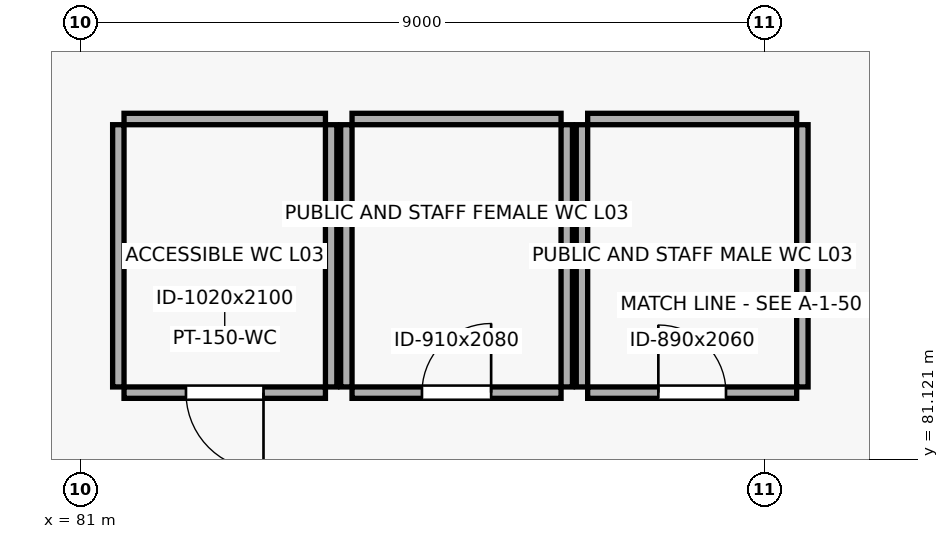
"""IFC4 building model, lengths in metres.
Left out: names, types, materials, properties, quantities, classifications, styles, units other than length and angle.
Written with IfcOpenShell. Run it as: python <this file> out.ifc"""

import sys

from ifc_helpers import new_model, si_unit, direction, frame, frame_2d, origin, place, context, subcontext, project, spatial, rectangle, extrude, element, fill, save


model = new_model("IFC4")
c1 = context("Model", 3, precision=1e-05, world=origin(), true_north=direction((0.0, 1.0)))
c2 = subcontext(c1, "Body", "Model", "MODEL_VIEW")
j1 = project(units=[si_unit("LENGTHUNIT", "METRE"), si_unit("PLANEANGLEUNIT", "RADIAN")], contexts=[c1])
p1 = place(None, origin())
s1 = spatial("IfcSite", under=j1, at=p1, CompositionType="ELEMENT")
p2 = place(p1, origin())
s2 = spatial("IfcBuilding", under=s1, at=p2, CompositionType="ELEMENT")
p3 = place(p2, frame((0.0, 0.0, 13.5)))
s3 = spatial("IfcBuildingStorey", under=s2, at=p3, CompositionType="ELEMENT", Elevation=13.5)
p4 = place(p3, frame((81.575, 82.0, 0.0), z_axis=(0.0, 0.0, 1.0), x_axis=(1.0, 0.0, 0.0)))
e1 = element("IfcWall", 1, at=p4, inside=s3, PredefinedType="PARTITIONING", context=c2, shape_type="SweptSolid", body=[
    extrude(rectangle(XDim=2.65, YDim=0.15, at=frame_2d((1.325, 0.0))), origin(), (0.0, 0.0, 1.0), 4.2),
])
p5 = place(p4, frame((0.815, 0.0, 0.0)))
e2 = element("IfcOpeningElement", 2, at=p5, cuts=e1, PredefinedType="OPENING", context=c2, shape_type="SweptSolid", body=[
    extrude(rectangle(XDim=1.02, YDim=2.1, at=frame_2d((0.51, 1.05))), frame((0.0, 0.087, 0.0), z_axis=(0.0, -1.0, 0.0), x_axis=(1.0, 0.0, 0.0)), (0.0, 0.0, 1.0), 0.174),
])
p6 = place(p3, frame((81.575, 85.6, 0.0), z_axis=(0.0, 0.0, 1.0), x_axis=(1.0, 0.0, 0.0)))
e3 = element("IfcWall", 3, at=p6, inside=s3, PredefinedType="PARTITIONING", context=c2, shape_type="SweptSolid", body=[
    extrude(rectangle(XDim=2.65, YDim=0.15, at=frame_2d((1.325, 0.0))), origin(), (0.0, 0.0, 1.0), 4.2),
])
for number, where, z_axis, x_axis in (
    (4, (81.5, 82.075, 0.0), (0.0, 0.0, 1.0), (0.0, 1.0, 0.0)),
    (5, (84.3, 82.075, 0.0), (0.0, 0.0, 1.0), (0.0, 1.0, 0.0)),
):
    element("IfcWall", number, at=place(p3, frame(where, z_axis=z_axis, x_axis=x_axis)), inside=s3, PredefinedType="PARTITIONING", context=c2, shape_type="SweptSolid", body=[
        extrude(rectangle(XDim=3.45, YDim=0.15, at=frame_2d((1.725, 0.0))), origin(), (0.0, 0.0, 1.0), 4.2),
    ])
p7 = place(p3, frame((84.575, 82.0, 0.0), z_axis=(0.0, 0.0, 1.0), x_axis=(1.0, 0.0, 0.0)))
e6 = element("IfcWall", 6, at=p7, inside=s3, PredefinedType="PARTITIONING", context=c2, shape_type="SweptSolid", body=[
    extrude(rectangle(XDim=2.75, YDim=0.15, at=frame_2d((1.375, 0.0))), origin(), (0.0, 0.0, 1.0), 4.2),
])
p8 = place(p7, frame((0.92, 0.0, 0.0)))
e7 = element("IfcOpeningElement", 7, at=p8, cuts=e6, PredefinedType="OPENING", context=c2, shape_type="SweptSolid", body=[
    extrude(rectangle(XDim=0.91, YDim=2.08, at=frame_2d((0.455, 1.04))), frame((0.0, 0.087, 0.0), z_axis=(0.0, -1.0, 0.0), x_axis=(1.0, 0.0, 0.0)), (0.0, 0.0, 1.0), 0.174),
])
p9 = place(p3, frame((84.575, 85.6, 0.0), z_axis=(0.0, 0.0, 1.0), x_axis=(1.0, 0.0, 0.0)))
e8 = element("IfcWall", 8, at=p9, inside=s3, PredefinedType="PARTITIONING", context=c2, shape_type="SweptSolid", body=[
    extrude(rectangle(XDim=2.75, YDim=0.15, at=frame_2d((1.375, 0.0))), origin(), (0.0, 0.0, 1.0), 4.2),
])
for number, where, z_axis, x_axis in (
    (9, (84.5, 82.075, 0.0), (0.0, 0.0, 1.0), (0.0, 1.0, 0.0)),
    (10, (87.4, 82.075, 0.0), (0.0, 0.0, 1.0), (0.0, 1.0, 0.0)),
):
    element("IfcWall", number, at=place(p3, frame(where, z_axis=z_axis, x_axis=x_axis)), inside=s3, PredefinedType="PARTITIONING", context=c2, shape_type="SweptSolid", body=[
        extrude(rectangle(XDim=3.45, YDim=0.15, at=frame_2d((1.725, 0.0))), origin(), (0.0, 0.0, 1.0), 4.2),
    ])
p10 = place(p3, frame((87.675, 82.0, 0.0), z_axis=(0.0, 0.0, 1.0), x_axis=(1.0, 0.0, 0.0)))
e11 = element("IfcWall", 11, at=p10, inside=s3, PredefinedType="PARTITIONING", context=c2, shape_type="SweptSolid", body=[
    extrude(rectangle(XDim=2.75, YDim=0.15, at=frame_2d((1.375, 0.0))), origin(), (0.0, 0.0, 1.0), 4.2),
])
p11 = place(p10, frame((0.93, 0.0, 0.0)))
e12 = element("IfcOpeningElement", 12, at=p11, cuts=e11, PredefinedType="OPENING", context=c2, shape_type="SweptSolid", body=[
    extrude(rectangle(XDim=0.89, YDim=2.06, at=frame_2d((0.445, 1.03))), frame((0.0, 0.087, 0.0), z_axis=(0.0, -1.0, 0.0), x_axis=(1.0, 0.0, 0.0)), (0.0, 0.0, 1.0), 0.174),
])
p12 = place(p3, frame((87.675, 85.6, 0.0), z_axis=(0.0, 0.0, 1.0), x_axis=(1.0, 0.0, 0.0)))
e13 = element("IfcWall", 13, at=p12, inside=s3, PredefinedType="PARTITIONING", context=c2, shape_type="SweptSolid", body=[
    extrude(rectangle(XDim=2.75, YDim=0.15, at=frame_2d((1.375, 0.0))), origin(), (0.0, 0.0, 1.0), 4.2),
])
for number, where, z_axis, x_axis in (
    (14, (87.6, 82.075, 0.0), (0.0, 0.0, 1.0), (0.0, 1.0, 0.0)),
    (15, (90.5, 82.075, 0.0), (0.0, 0.0, 1.0), (0.0, 1.0, 0.0)),
):
    element("IfcWall", number, at=place(p3, frame(where, z_axis=z_axis, x_axis=x_axis)), inside=s3, PredefinedType="PARTITIONING", context=c2, shape_type="SweptSolid", body=[
        extrude(rectangle(XDim=3.45, YDim=0.15, at=frame_2d((1.725, 0.0))), origin(), (0.0, 0.0, 1.0), 4.2),
    ])
p13 = place(p5, frame((1.02, 0.0, 0.0), z_axis=(0.0, 0.0, 1.0), x_axis=(-1.0, 0.0, 0.0)))
e16 = element("IfcDoor", 16, at=p13, inside=s3, OperationType="SINGLE_SWING_LEFT", PredefinedType="DOOR", context=c2, shape_type="SweptSolid", body=[
    extrude(rectangle(XDim=1.02, YDim=2.1, at=frame_2d((0.51, 1.05))), frame((0.0, 0.025, 0.0), z_axis=(0.0, -1.0, 0.0), x_axis=(1.0, 0.0, 0.0)), (0.0, 0.0, 1.0), 0.05),
])
fill(e2, e16)
p14 = place(p8, origin())
e17 = element("IfcDoor", 17, at=p14, inside=s3, OperationType="SINGLE_SWING_RIGHT", PredefinedType="DOOR", context=c2, shape_type="SweptSolid", body=[
    extrude(rectangle(XDim=0.91, YDim=2.08, at=frame_2d((0.455, 1.04))), frame((0.0, 0.025, 0.0), z_axis=(0.0, -1.0, 0.0), x_axis=(1.0, 0.0, 0.0)), (0.0, 0.0, 1.0), 0.05),
])
fill(e7, e17)
p15 = place(p11, origin())
e18 = element("IfcDoor", 18, at=p15, inside=s3, OperationType="SINGLE_SWING_LEFT", PredefinedType="DOOR", context=c2, shape_type="SweptSolid", body=[
    extrude(rectangle(XDim=0.89, YDim=2.06, at=frame_2d((0.445, 1.03))), frame((0.0, 0.025, 0.0), z_axis=(0.0, -1.0, 0.0), x_axis=(1.0, 0.0, 0.0)), (0.0, 0.0, 1.0), 0.05),
])
fill(e12, e18)
save(model, sys.argv[1])
